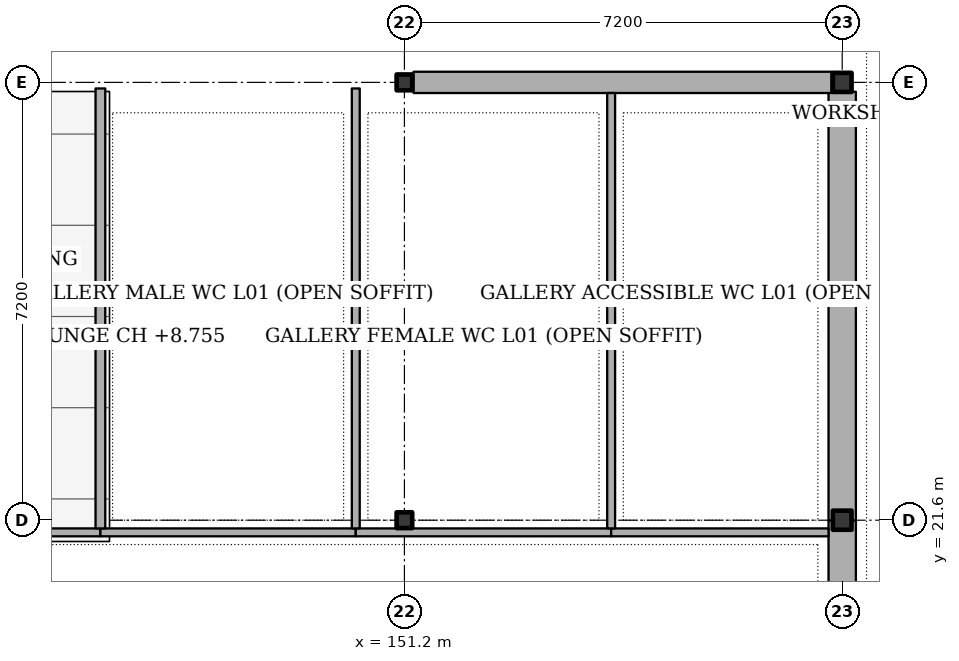
"""IFC4 building model, lengths in metres.
Left out: names, types, materials, properties, quantities, classifications, styles, units other than length and angle.
Written with IfcOpenShell. Run it as: python <this file> out.ifc"""

import sys

from ifc_helpers import new_model, si_unit, direction, frame, frame_2d, origin, origin_2d, place, context, subcontext, project, spatial, rectangle, i_section, extrude, element, fill, save


model = new_model("IFC4")
c1 = context("Model", 3, precision=1e-05, world=origin(), true_north=direction((0.0, 1.0)))
c2 = subcontext(c1, "Body", "Model", "MODEL_VIEW")
j1 = project(units=[si_unit("LENGTHUNIT", "METRE"), si_unit("PLANEANGLEUNIT", "RADIAN")], contexts=[c1])
p1 = place(None, origin())
s1 = spatial("IfcSite", under=j1, at=p1, CompositionType="ELEMENT")
p2 = place(p1, origin())
s2 = spatial("IfcBuilding", under=s1, at=p2, CompositionType="ELEMENT")
p3 = place(p2, frame((0.0, 0.0, 5.4)))
s3 = spatial("IfcBuildingStorey", under=s2, at=p3, CompositionType="ELEMENT", Elevation=5.4)
for number, where, z_axis, x_axis in (
    (1, (151.2, 21.6, 0.0), (0.0, 0.0, 1.0), (1.0, 0.0, 0.0)),
    (2, (151.2, 28.8, 0.0), (0.0, 0.0, 1.0), (1.0, 0.0, 0.0)),
):
    element("IfcColumn", number, at=place(p3, frame(where, z_axis=z_axis, x_axis=x_axis)), inside=s3, PredefinedType="COLUMN", context=c2, shape_type="SweptSolid", body=[
        extrude(i_section(OverallWidth=0.256, OverallDepth=0.26, WebThickness=0.01, FlangeThickness=0.017, FilletRadius=0.013, at=origin_2d()), origin(), (0.0, 0.0, 1.0), 4.5),
    ])
for number, where, z_axis, x_axis in (
    (3, (158.4, 21.6, 0.0), (0.0, 0.0, 1.0), (1.0, 0.0, 0.0)),
    (4, (158.4, 28.8, 0.0), (0.0, 0.0, 1.0), (1.0, 0.0, 0.0)),
):
    element("IfcColumn", number, at=place(p3, frame(where, z_axis=z_axis, x_axis=x_axis)), inside=s3, PredefinedType="COLUMN", context=c2, shape_type="SweptSolid", body=[
        extrude(i_section(OverallWidth=0.307, OverallDepth=0.314, WebThickness=0.012, FlangeThickness=0.019, FilletRadius=0.015, at=origin_2d()), origin(), (0.0, 0.0, 1.0), 4.5),
    ])
p4 = place(p3, frame((158.4, 14.4, 0.0), z_axis=(0.0, 0.0, 1.0), x_axis=(0.0, 1.0, 0.0)))
e5 = element("IfcWall", 5, at=p4, inside=s3, PredefinedType="SOLIDWALL", context=c2, shape_type="SweptSolid", body=[
    extrude(rectangle(XDim=7.2, YDim=0.45, at=frame_2d((3.6, 0.0))), origin(), (0.0, 0.0, 1.0), 3.553),
])
p5 = place(p4, frame((4.8, 0.0, 0.0)))
e6 = element("IfcOpeningElement", 6, at=p5, cuts=e5, PredefinedType="OPENING", context=c2, shape_type="SweptSolid", body=[
    extrude(rectangle(XDim=1.4, YDim=2.15, at=frame_2d((0.7, 1.075))), frame((0.0, 0.235, 0.0), z_axis=(0.0, -1.0, 0.0), x_axis=(1.0, 0.0, 0.0)), (0.0, 0.0, 1.0), 0.47),
])
p6 = place(p3, frame((158.4, 21.6, 0.0), z_axis=(0.0, 0.0, 1.0), x_axis=(0.0, 1.0, 0.0)))
e7 = element("IfcWall", 7, at=p6, inside=s3, PredefinedType="SOLIDWALL", context=c2, shape_type="SweptSolid", body=[
    extrude(rectangle(XDim=7.046, YDim=0.45, at=frame_2d((3.523, 0.0))), origin(), (0.0, 0.0, 1.0), 3.553),
])
p7 = place(p3, frame((151.35, 28.8, 0.0), z_axis=(0.0, 0.0, 1.0), x_axis=(1.0, 0.0, 0.0)))
e8 = element("IfcWall", 8, at=p7, inside=s3, PredefinedType="SOLIDWALL", context=c2, shape_type="SweptSolid", body=[
    extrude(rectangle(XDim=6.873, YDim=0.35, at=frame_2d((3.437, 0.0))), origin(), (0.0, 0.0, 1.0), 3.39),
])
p8 = place(p7, frame((3.661, 0.0, 1.05)))
e9 = element("IfcOpeningElement", 9, at=p8, cuts=e8, PredefinedType="OPENING", context=c2, shape_type="SweptSolid", body=[
    extrude(rectangle(XDim=2.65, YDim=1.6, at=frame_2d((1.325, 0.8))), frame((0.0, 0.185, 0.0), z_axis=(0.0, -1.0, 0.0), x_axis=(1.0, 0.0, 0.0)), (0.0, 0.0, 1.0), 0.37),
])
p9 = place(p3, frame((101.0, 21.4, 0.0), z_axis=(0.0, 0.0, 1.0), x_axis=(1.0, 0.0, 0.0)))
e10 = element("IfcWall", 10, at=p9, inside=s3, PredefinedType="PARTITIONING", context=c2, shape_type="SweptSolid", body=[
    extrude(rectangle(XDim=45.2, YDim=0.13, at=frame_2d((22.6, 0.0))), origin(), (0.0, 0.0, 1.0), 3.55),
])
p10 = place(p9, frame((16.43, 0.0, 0.0)))
e11 = element("IfcOpeningElement", 11, at=p10, cuts=e10, PredefinedType="OPENING", context=c2, shape_type="SweptSolid", body=[
    extrude(rectangle(XDim=1.6, YDim=2.2, at=frame_2d((0.8, 1.1))), frame((0.0, 0.075, 0.0), z_axis=(0.0, -1.0, 0.0), x_axis=(1.0, 0.0, 0.0)), (0.0, 0.0, 1.0), 0.15),
])
p11 = place(p3, frame((146.2, 21.4, 0.0), z_axis=(0.0, 0.0, 1.0), x_axis=(1.0, 0.0, 0.0)))
e12 = element("IfcWall", 12, at=p11, inside=s3, PredefinedType="PARTITIONING", context=c2, shape_type="SweptSolid", body=[
    extrude(rectangle(XDim=4.2, YDim=0.13, at=frame_2d((2.1, 0.0))), origin(), (0.0, 0.0, 1.0), 3.55),
])
p12 = place(p11, frame((0.985, 0.0, 0.0)))
e13 = element("IfcOpeningElement", 13, at=p12, cuts=e12, PredefinedType="OPENING", context=c2, shape_type="SweptSolid", body=[
    extrude(rectangle(XDim=0.9, YDim=2.05, at=frame_2d((0.45, 1.025))), frame((0.0, 0.075, 0.0), z_axis=(0.0, -1.0, 0.0), x_axis=(1.0, 0.0, 0.0)), (0.0, 0.0, 1.0), 0.15),
])
p13 = place(p3, frame((150.4, 21.4, 0.0), z_axis=(0.0, 0.0, 1.0), x_axis=(1.0, 0.0, 0.0)))
e14 = element("IfcWall", 14, at=p13, inside=s3, PredefinedType="PARTITIONING", context=c2, shape_type="SweptSolid", body=[
    extrude(rectangle(XDim=4.2, YDim=0.13, at=frame_2d((2.1, 0.0))), origin(), (0.0, 0.0, 1.0), 3.55),
])
p14 = place(p13, frame((2.98, 0.0, 0.0)))
e15 = element("IfcOpeningElement", 15, at=p14, cuts=e14, PredefinedType="OPENING", context=c2, shape_type="SweptSolid", body=[
    extrude(rectangle(XDim=0.9, YDim=2.05, at=frame_2d((0.45, 1.025))), frame((0.0, 0.075, 0.0), z_axis=(0.0, -1.0, 0.0), x_axis=(1.0, 0.0, 0.0)), (0.0, 0.0, 1.0), 0.15),
])
p15 = place(p3, frame((154.6, 21.4, 0.0), z_axis=(0.0, 0.0, 1.0), x_axis=(1.0, 0.0, 0.0)))
e16 = element("IfcWall", 16, at=p15, inside=s3, PredefinedType="PARTITIONING", context=c2, shape_type="SweptSolid", body=[
    extrude(rectangle(XDim=3.575, YDim=0.13, at=frame_2d((1.788, 0.0))), origin(), (0.0, 0.0, 1.0), 3.55),
])
p16 = place(p15, frame((0.32, 0.0, 0.0)))
e17 = element("IfcOpeningElement", 17, at=p16, cuts=e16, PredefinedType="OPENING", context=c2, shape_type="SweptSolid", body=[
    extrude(rectangle(XDim=0.98, YDim=2.1, at=frame_2d((0.49, 1.05))), frame((0.0, 0.075, 0.0), z_axis=(0.0, -1.0, 0.0), x_axis=(1.0, 0.0, 0.0)), (0.0, 0.0, 1.0), 0.15),
])
p17 = place(p3, frame((146.2, 21.465, 0.0), z_axis=(0.0, 0.0, 1.0), x_axis=(0.0, 1.0, 0.0)))
e18 = element("IfcWall", 18, at=p17, inside=s3, PredefinedType="PARTITIONING", context=c2, shape_type="SweptSolid", body=[
    extrude(rectangle(XDim=7.235, YDim=0.16, at=frame_2d((3.617, 0.0))), origin(), (0.0, 0.0, 1.0), 3.385),
])
p18 = place(p3, frame((150.4, 21.465, 0.0), z_axis=(0.0, 0.0, 1.0), x_axis=(0.0, 1.0, 0.0)))
e19 = element("IfcWall", 19, at=p18, inside=s3, PredefinedType="PARTITIONING", context=c2, shape_type="SweptSolid", body=[
    extrude(rectangle(XDim=7.235, YDim=0.13, at=frame_2d((3.617, 0.0))), origin(), (0.0, 0.0, 1.0), 3.385),
])
p19 = place(p3, frame((154.6, 21.465, 0.0), z_axis=(0.0, 0.0, 1.0), x_axis=(0.0, 1.0, 0.0)))
e20 = element("IfcWall", 20, at=p19, inside=s3, PredefinedType="PARTITIONING", context=c2, shape_type="SweptSolid", body=[
    extrude(rectangle(XDim=7.16, YDim=0.13, at=frame_2d((3.58, 0.0))), origin(), (0.0, 0.0, 1.0), 3.55),
])
p20 = place(p8, origin())
e21 = element("IfcWindow", 21, at=p20, inside=s3, PartitioningType="SINGLE_PANEL", PredefinedType="WINDOW", context=c2, shape_type="SweptSolid", body=[
    extrude(rectangle(XDim=2.65, YDim=1.6, at=frame_2d((1.325, 0.8))), frame((0.0, 0.03, 0.0), z_axis=(0.0, -1.0, 0.0), x_axis=(1.0, 0.0, 0.0)), (0.0, 0.0, 1.0), 0.06),
])
fill(e9, e21)
p21 = place(p12, origin())
e22 = element("IfcDoor", 22, at=p21, inside=s3, OperationType="SINGLE_SWING_LEFT", PredefinedType="DOOR", context=c2, shape_type="SweptSolid", body=[
    extrude(rectangle(XDim=0.9, YDim=2.05, at=frame_2d((0.45, 1.025))), frame((0.0, 0.025, 0.0), z_axis=(0.0, -1.0, 0.0), x_axis=(1.0, 0.0, 0.0)), (0.0, 0.0, 1.0), 0.05),
])
fill(e13, e22)
p22 = place(p14, origin())
e23 = element("IfcDoor", 23, at=p22, inside=s3, OperationType="SINGLE_SWING_RIGHT", PredefinedType="DOOR", context=c2, shape_type="SweptSolid", body=[
    extrude(rectangle(XDim=0.9, YDim=2.05, at=frame_2d((0.45, 1.025))), frame((0.0, 0.025, 0.0), z_axis=(0.0, -1.0, 0.0), x_axis=(1.0, 0.0, 0.0)), (0.0, 0.0, 1.0), 0.05),
])
fill(e15, e23)
p23 = place(p16, origin())
e24 = element("IfcDoor", 24, at=p23, inside=s3, OperationType="SINGLE_SWING_LEFT", PredefinedType="DOOR", context=c2, shape_type="SweptSolid", body=[
    extrude(rectangle(XDim=0.98, YDim=2.1, at=frame_2d((0.49, 1.05))), frame((0.0, 0.025, 0.0), z_axis=(0.0, -1.0, 0.0), x_axis=(1.0, 0.0, 0.0)), (0.0, 0.0, 1.0), 0.05),
])
fill(e17, e24)
save(model, sys.argv[1])
